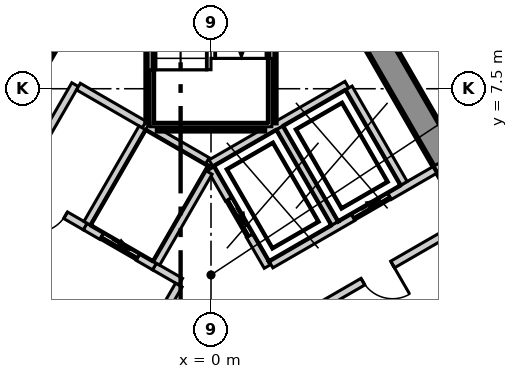
"""IFC4 building model, lengths in metres.
Left out: names, types, materials, properties, quantities, classifications, styles, units other than length and angle.
Written with IfcOpenShell. Run it as: python <this file> out.ifc"""

import sys

from ifc_helpers import new_model, si_unit, direction, frame, frame_2d, origin, place, context, subcontext, project, spatial, polyline, rectangle, outline, extrude, element, fill, save


model = new_model("IFC4")
c1 = context("Model", 3, precision=1e-05, world=origin(), true_north=direction((0.0, 1.0)))
c2 = subcontext(c1, "Body", "Model", "MODEL_VIEW")
j1 = project(units=[si_unit("LENGTHUNIT", "METRE"), si_unit("PLANEANGLEUNIT", "RADIAN")], contexts=[c1])
p1 = place(None, origin())
s1 = spatial("IfcSite", under=j1, at=p1, CompositionType="ELEMENT")
p2 = place(p1, origin())
s2 = spatial("IfcBuilding", under=s1, at=p2, CompositionType="ELEMENT")
p3 = place(p2, frame((0.0, 0.0, 239.3)))
s3 = spatial("IfcBuildingStorey", under=s2, at=p3, CompositionType="ELEMENT", Elevation=239.3)
p4 = place(p3, frame((-1.703, 13.35, -0.3), z_axis=(0.0, 0.0, 1.0), x_axis=(-0.500011533395, -0.866018744874, 0.0)))
e1 = element("IfcWall", 1, at=p4, inside=s3, PredefinedType="SHEAR", context=c2, shape_type="SweptSolid", body=[
    extrude(outline(polyline([(-0.202, -0.35), (1.782, -0.35), (3.766, -0.35), (5.75, -0.35), (7.734, -0.35), (9.718, -0.35), (11.702, -0.35), (13.686, -0.35), (15.67, -0.35), (17.654, -0.35), (19.638, -0.35), (21.622, -0.35), (21.218, 0.35), (19.307, 0.35), (17.397, 0.35), (15.486, 0.35), (13.576, 0.35), (11.665, 0.35), (9.755, 0.35), (7.844, 0.35), (5.934, 0.35), (4.023, 0.35), (2.113, 0.35), (0.202, 0.35), (-0.202, -0.35)])), origin(), (0.0, 0.0, 1.0), 4.0),
])
p5 = place(p4, frame((10.16, 0.0, 0.3)))
e2 = element("IfcOpeningElement", 2, at=p5, cuts=e1, PredefinedType="OPENING", context=c2, shape_type="SweptSolid", body=[
    extrude(rectangle(XDim=1.1, YDim=2.1, at=frame_2d((0.55, 1.05))), frame((0.0, 0.36, 0.0), z_axis=(0.0, -1.0, 0.0), x_axis=(1.0, 0.0, 0.0)), (0.0, 0.0, 1.0), 0.72),
])
p6 = place(p3, frame((12.413, -5.2, -0.3), z_axis=(0.0, 0.0, 1.0), x_axis=(-0.500011533395, 0.866018744874, 0.0)))
e3 = element("IfcWall", 3, at=p6, inside=s3, PredefinedType="SHEAR", context=c2, shape_type="SweptSolid", body=[
    extrude(outline(polyline([(-0.202, -0.35), (1.782, -0.35), (3.766, -0.35), (5.75, -0.35), (7.734, -0.35), (9.718, -0.35), (11.702, -0.35), (13.686, -0.35), (15.67, -0.35), (17.654, -0.35), (19.638, -0.35), (21.622, -0.35), (21.218, 0.35), (19.307, 0.35), (17.397, 0.35), (15.486, 0.35), (13.576, 0.35), (11.665, 0.35), (9.755, 0.35), (7.844, 0.35), (5.934, 0.35), (4.023, 0.35), (2.113, 0.35), (0.202, 0.35), (-0.202, -0.35)])), origin(), (0.0, 0.0, 1.0), 4.0),
])
p7 = place(p6, frame((4.055, 0.0, 0.3)))
e4 = element("IfcOpeningElement", 4, at=p7, cuts=e3, PredefinedType="OPENING", context=c2, shape_type="SweptSolid", body=[
    extrude(rectangle(XDim=0.9, YDim=2.1, at=frame_2d((0.45, 1.05))), frame((0.0, 0.36, 0.0), z_axis=(0.0, -1.0, 0.0), x_axis=(1.0, 0.0, 0.0)), (0.0, 0.0, 1.0), 0.72),
])
p8 = place(p6, frame((16.415, 0.0, 0.3)))
e5 = element("IfcOpeningElement", 5, at=p8, cuts=e3, PredefinedType="OPENING", context=c2, shape_type="SweptSolid", body=[
    extrude(rectangle(XDim=1.0, YDim=2.1, at=frame_2d((0.5, 1.05))), frame((0.0, 0.36, 0.0), z_axis=(0.0, -1.0, 0.0), x_axis=(1.0, 0.0, 0.0)), (0.0, 0.0, 1.0), 0.72),
])
p9 = place(p3, frame((-2.687, 29.995, 0.0), z_axis=(0.0, 0.0, 1.0), x_axis=(-0.499992950893, -0.86602947355, 0.0)))
e6 = element("IfcWall", 6, at=p9, inside=s3, PredefinedType="ELEMENTEDWALL", context=c2, shape_type="SweptSolid", body=[
    extrude(rectangle(XDim=49.247, YDim=0.2, at=frame_2d((24.624, 0.0))), origin(), (0.0, 0.0, 1.0), 3.7),
])
p10 = place(p9, frame((2.119, 0.0, 0.9)))
e7 = element("IfcOpeningElement", 7, at=p10, cuts=e6, PredefinedType="OPENING", context=c2, shape_type="SweptSolid", body=[
    extrude(rectangle(XDim=4.2, YDim=2.5, at=frame_2d((2.1, 1.25))), frame((0.0, 0.11, 0.0), z_axis=(0.0, -1.0, 0.0), x_axis=(1.0, 0.0, 0.0)), (0.0, 0.0, 1.0), 0.22),
])
p11 = place(p9, frame((7.951, 0.0, 0.9)))
e8 = element("IfcOpeningElement", 8, at=p11, cuts=e6, PredefinedType="OPENING", context=c2, shape_type="SweptSolid", body=[
    extrude(rectangle(XDim=4.2, YDim=2.5, at=frame_2d((2.1, 1.25))), frame((0.0, 0.11, 0.0), z_axis=(0.0, -1.0, 0.0), x_axis=(1.0, 0.0, 0.0)), (0.0, 0.0, 1.0), 0.22),
])
p12 = place(p9, frame((13.784, 0.0, 0.9)))
e9 = element("IfcOpeningElement", 9, at=p12, cuts=e6, PredefinedType="OPENING", context=c2, shape_type="SweptSolid", body=[
    extrude(rectangle(XDim=4.2, YDim=2.5, at=frame_2d((2.1, 1.25))), frame((0.0, 0.11, 0.0), z_axis=(0.0, -1.0, 0.0), x_axis=(1.0, 0.0, 0.0)), (0.0, 0.0, 1.0), 0.22),
])
p13 = place(p9, frame((19.617, 0.0, 0.9)))
e10 = element("IfcOpeningElement", 10, at=p13, cuts=e6, PredefinedType="OPENING", context=c2, shape_type="SweptSolid", body=[
    extrude(rectangle(XDim=4.2, YDim=2.5, at=frame_2d((2.1, 1.25))), frame((0.0, 0.11, 0.0), z_axis=(0.0, -1.0, 0.0), x_axis=(1.0, 0.0, 0.0)), (0.0, 0.0, 1.0), 0.22),
])
p14 = place(p9, frame((25.449, 0.0, 0.9)))
e11 = element("IfcOpeningElement", 11, at=p14, cuts=e6, PredefinedType="OPENING", context=c2, shape_type="SweptSolid", body=[
    extrude(rectangle(XDim=4.2, YDim=2.5, at=frame_2d((2.1, 1.25))), frame((0.0, 0.11, 0.0), z_axis=(0.0, -1.0, 0.0), x_axis=(1.0, 0.0, 0.0)), (0.0, 0.0, 1.0), 0.22),
])
p15 = place(p9, frame((31.282, 0.0, 0.9)))
e12 = element("IfcOpeningElement", 12, at=p15, cuts=e6, PredefinedType="OPENING", context=c2, shape_type="SweptSolid", body=[
    extrude(rectangle(XDim=4.2, YDim=2.5, at=frame_2d((2.1, 1.25))), frame((0.0, 0.11, 0.0), z_axis=(0.0, -1.0, 0.0), x_axis=(1.0, 0.0, 0.0)), (0.0, 0.0, 1.0), 0.22),
])
p16 = place(p9, frame((37.115, 0.0, 0.9)))
e13 = element("IfcOpeningElement", 13, at=p16, cuts=e6, PredefinedType="OPENING", context=c2, shape_type="SweptSolid", body=[
    extrude(rectangle(XDim=4.2, YDim=2.5, at=frame_2d((2.1, 1.25))), frame((0.0, 0.11, 0.0), z_axis=(0.0, -1.0, 0.0), x_axis=(1.0, 0.0, 0.0)), (0.0, 0.0, 1.0), 0.22),
])
p17 = place(p9, frame((42.947, 0.0, 0.9)))
e14 = element("IfcOpeningElement", 14, at=p17, cuts=e6, PredefinedType="OPENING", context=c2, shape_type="SweptSolid", body=[
    extrude(rectangle(XDim=4.2, YDim=2.5, at=frame_2d((2.1, 1.25))), frame((0.0, 0.11, 0.0), z_axis=(0.0, -1.0, 0.0), x_axis=(1.0, 0.0, 0.0)), (0.0, 0.0, 1.0), 0.22),
])
p18 = place(p3, frame((27.32, -12.671, 0.0), z_axis=(0.0, 0.0, 1.0), x_axis=(-0.499995097538, 0.866028234204, 0.0)))
e15 = element("IfcWall", 15, at=p18, inside=s3, PredefinedType="ELEMENTEDWALL", context=c2, shape_type="SweptSolid", body=[
    extrude(rectangle(XDim=49.247, YDim=0.2, at=frame_2d((24.623, 0.0))), origin(), (0.0, 0.0, 1.0), 3.7),
])
p19 = place(p18, frame((2.119, 0.0, 0.9)))
e16 = element("IfcOpeningElement", 16, at=p19, cuts=e15, PredefinedType="OPENING", context=c2, shape_type="SweptSolid", body=[
    extrude(rectangle(XDim=4.2, YDim=2.5, at=frame_2d((2.1, 1.25))), frame((0.0, 0.11, 0.0), z_axis=(0.0, -1.0, 0.0), x_axis=(1.0, 0.0, 0.0)), (0.0, 0.0, 1.0), 0.22),
])
p20 = place(p18, frame((7.952, 0.0, 0.9)))
e17 = element("IfcOpeningElement", 17, at=p20, cuts=e15, PredefinedType="OPENING", context=c2, shape_type="SweptSolid", body=[
    extrude(rectangle(XDim=4.2, YDim=2.5, at=frame_2d((2.1, 1.25))), frame((0.0, 0.11, 0.0), z_axis=(0.0, -1.0, 0.0), x_axis=(1.0, 0.0, 0.0)), (0.0, 0.0, 1.0), 0.22),
])
p21 = place(p18, frame((13.784, 0.0, 0.9)))
e18 = element("IfcOpeningElement", 18, at=p21, cuts=e15, PredefinedType="OPENING", context=c2, shape_type="SweptSolid", body=[
    extrude(rectangle(XDim=4.2, YDim=2.5, at=frame_2d((2.1, 1.25))), frame((0.0, 0.11, 0.0), z_axis=(0.0, -1.0, 0.0), x_axis=(1.0, 0.0, 0.0)), (0.0, 0.0, 1.0), 0.22),
])
p22 = place(p18, frame((19.617, 0.0, 0.9)))
e19 = element("IfcOpeningElement", 19, at=p22, cuts=e15, PredefinedType="OPENING", context=c2, shape_type="SweptSolid", body=[
    extrude(rectangle(XDim=4.2, YDim=2.5, at=frame_2d((2.1, 1.25))), frame((0.0, 0.11, 0.0), z_axis=(0.0, -1.0, 0.0), x_axis=(1.0, 0.0, 0.0)), (0.0, 0.0, 1.0), 0.22),
])
p23 = place(p18, frame((25.45, 0.0, 0.9)))
e20 = element("IfcOpeningElement", 20, at=p23, cuts=e15, PredefinedType="OPENING", context=c2, shape_type="SweptSolid", body=[
    extrude(rectangle(XDim=4.2, YDim=2.5, at=frame_2d((2.1, 1.25))), frame((0.0, 0.11, 0.0), z_axis=(0.0, -1.0, 0.0), x_axis=(1.0, 0.0, 0.0)), (0.0, 0.0, 1.0), 0.22),
])
p24 = place(p18, frame((31.282, 0.0, 0.9)))
e21 = element("IfcOpeningElement", 21, at=p24, cuts=e15, PredefinedType="OPENING", context=c2, shape_type="SweptSolid", body=[
    extrude(rectangle(XDim=4.2, YDim=2.5, at=frame_2d((2.1, 1.25))), frame((0.0, 0.11, 0.0), z_axis=(0.0, -1.0, 0.0), x_axis=(1.0, 0.0, 0.0)), (0.0, 0.0, 1.0), 0.22),
])
p25 = place(p18, frame((37.115, 0.0, 0.9)))
e22 = element("IfcOpeningElement", 22, at=p25, cuts=e15, PredefinedType="OPENING", context=c2, shape_type="SweptSolid", body=[
    extrude(rectangle(XDim=4.2, YDim=2.5, at=frame_2d((2.1, 1.25))), frame((0.0, 0.11, 0.0), z_axis=(0.0, -1.0, 0.0), x_axis=(1.0, 0.0, 0.0)), (0.0, 0.0, 1.0), 0.22),
])
p26 = place(p18, frame((42.947, 0.0, 0.9)))
e23 = element("IfcOpeningElement", 23, at=p26, cuts=e15, PredefinedType="OPENING", context=c2, shape_type="SweptSolid", body=[
    extrude(rectangle(XDim=4.2, YDim=2.5, at=frame_2d((2.1, 1.25))), frame((0.0, 0.11, 0.0), z_axis=(0.0, -1.0, 0.0), x_axis=(1.0, 0.0, 0.0)), (0.0, 0.0, 1.0), 0.22),
])
p27 = place(p3, frame((-20.883, -11.97, 0.0), z_axis=(0.0, 0.0, 1.0), x_axis=(0.500006150555, 0.866021852731, 0.0)))
e24 = element("IfcWall", 24, at=p27, inside=s3, PredefinedType="PARTITIONING", context=c2, shape_type="SweptSolid", body=[
    extrude(rectangle(XDim=41.766, YDim=0.15, at=frame_2d((20.883, 0.0))), origin(), (0.0, 0.0, 1.0), 3.7),
])
p28 = place(p27, frame((36.616, 0.0, 0.0)))
e25 = element("IfcOpeningElement", 25, at=p28, cuts=e24, PredefinedType="OPENING", context=c2, shape_type="SweptSolid", body=[
    extrude(rectangle(XDim=1.1, YDim=2.1, at=frame_2d((0.55, 1.05))), frame((0.0, 0.085, 0.0), z_axis=(0.0, -1.0, 0.0), x_axis=(1.0, 0.0, 0.0)), (0.0, 0.0, 1.0), 0.17),
])
p29 = place(p27, frame((21.723, 0.0, 0.0)))
e26 = element("IfcOpeningElement", 26, at=p29, cuts=e24, PredefinedType="OPENING", context=c2, shape_type="SweptSolid", body=[
    extrude(rectangle(XDim=1.1, YDim=2.1, at=frame_2d((0.55, 1.05))), frame((0.0, 0.085, 0.0), z_axis=(0.0, -1.0, 0.0), x_axis=(1.0, 0.0, 0.0)), (0.0, 0.0, 1.0), 0.17),
])
p30 = place(p27, frame((30.423, 0.0, 0.0)))
e27 = element("IfcOpeningElement", 27, at=p30, cuts=e24, PredefinedType="OPENING", context=c2, shape_type="SweptSolid", body=[
    extrude(rectangle(XDim=0.9, YDim=2.1, at=frame_2d((0.45, 1.05))), frame((0.0, 0.085, 0.0), z_axis=(0.0, -1.0, 0.0), x_axis=(1.0, 0.0, 0.0)), (0.0, 0.0, 1.0), 0.17),
])
p31 = place(p27, frame((27.223, 0.0, 0.0)))
e28 = element("IfcOpeningElement", 28, at=p31, cuts=e24, PredefinedType="OPENING", context=c2, shape_type="SweptSolid", body=[
    extrude(rectangle(XDim=0.9, YDim=2.1, at=frame_2d((0.45, 1.05))), frame((0.0, 0.085, 0.0), z_axis=(0.0, -1.0, 0.0), x_axis=(1.0, 0.0, 0.0)), (0.0, 0.0, 1.0), 0.17),
])
p32 = place(p27, frame((24.323, 0.0, 0.0)))
e29 = element("IfcOpeningElement", 29, at=p32, cuts=e24, PredefinedType="OPENING", context=c2, shape_type="SweptSolid", body=[
    extrude(rectangle(XDim=1.0, YDim=2.1, at=frame_2d((0.5, 1.05))), frame((0.0, 0.085, 0.0), z_axis=(0.0, -1.0, 0.0), x_axis=(1.0, 0.0, 0.0)), (0.0, 0.0, 1.0), 0.17),
])
p33 = place(p27, frame((17.358, 0.0, 0.0)))
e30 = element("IfcOpeningElement", 30, at=p33, cuts=e24, PredefinedType="OPENING", context=c2, shape_type="SweptSolid", body=[
    extrude(rectangle(XDim=1.0, YDim=2.1, at=frame_2d((0.5, 1.05))), frame((0.0, 0.085, 0.0), z_axis=(0.0, -1.0, 0.0), x_axis=(1.0, 0.0, 0.0)), (0.0, 0.0, 1.0), 0.17),
])
p34 = place(p27, frame((6.825, 0.0, 0.0)))
e31 = element("IfcOpeningElement", 31, at=p34, cuts=e24, PredefinedType="OPENING", context=c2, shape_type="SweptSolid", body=[
    extrude(rectangle(XDim=1.1, YDim=2.1, at=frame_2d((0.55, 1.05))), frame((0.0, 0.085, 0.0), z_axis=(0.0, -1.0, 0.0), x_axis=(1.0, 0.0, 0.0)), (0.0, 0.0, 1.0), 0.17),
])
p35 = place(p3, frame((0.075, 24.07, 0.0), z_axis=(0.0, 0.0, 1.0), x_axis=(0.500006834213, -0.866021458014, 0.0)))
e32 = element("IfcWall", 32, at=p35, inside=s3, PredefinedType="PARTITIONING", context=c2, shape_type="SweptSolid", body=[
    extrude(rectangle(XDim=41.616, YDim=0.15, at=frame_2d((20.808, 0.0))), origin(), (0.0, 0.0, 1.0), 3.7),
])
p36 = place(p35, frame((36.616, 0.0, 0.0)))
e33 = element("IfcOpeningElement", 33, at=p36, cuts=e32, PredefinedType="OPENING", context=c2, shape_type="SweptSolid", body=[
    extrude(rectangle(XDim=1.1, YDim=2.1, at=frame_2d((0.55, 1.05))), frame((0.0, 0.085, 0.0), z_axis=(0.0, -1.0, 0.0), x_axis=(1.0, 0.0, 0.0)), (0.0, 0.0, 1.0), 0.17),
])
p37 = place(p35, frame((29.024, 0.0, 0.0)))
e34 = element("IfcOpeningElement", 34, at=p37, cuts=e32, PredefinedType="OPENING", context=c2, shape_type="SweptSolid", body=[
    extrude(rectangle(XDim=1.0, YDim=2.1, at=frame_2d((0.5, 1.05))), frame((0.0, 0.085, 0.0), z_axis=(0.0, -1.0, 0.0), x_axis=(1.0, 0.0, 0.0)), (0.0, 0.0, 1.0), 0.17),
])
p38 = place(p35, frame((23.19, 0.0, 0.0)))
e35 = element("IfcOpeningElement", 35, at=p38, cuts=e32, PredefinedType="OPENING", context=c2, shape_type="SweptSolid", body=[
    extrude(rectangle(XDim=1.0, YDim=2.1, at=frame_2d((0.5, 1.05))), frame((0.0, 0.085, 0.0), z_axis=(0.0, -1.0, 0.0), x_axis=(1.0, 0.0, 0.0)), (0.0, 0.0, 1.0), 0.17),
])
p39 = place(p35, frame((14.458, 0.0, 0.0)))
e36 = element("IfcOpeningElement", 36, at=p39, cuts=e32, PredefinedType="OPENING", context=c2, shape_type="SweptSolid", body=[
    extrude(rectangle(XDim=1.1, YDim=2.1, at=frame_2d((0.55, 1.05))), frame((0.0, 0.085, 0.0), z_axis=(0.0, -1.0, 0.0), x_axis=(1.0, 0.0, 0.0)), (0.0, 0.0, 1.0), 0.17),
])
p40 = place(p35, frame((3.993, 0.0, 0.0)))
e37 = element("IfcOpeningElement", 37, at=p40, cuts=e32, PredefinedType="OPENING", context=c2, shape_type="SweptSolid", body=[
    extrude(rectangle(XDim=1.1, YDim=2.1, at=frame_2d((0.55, 1.05))), frame((0.0, 0.085, 0.0), z_axis=(0.0, -1.0, 0.0), x_axis=(1.0, 0.0, 0.0)), (0.0, 0.0, 1.0), 0.17),
])
p41 = place(p3, frame((-0.002, 5.541, 0.0), z_axis=(0.0, 0.0, 1.0), x_axis=(0.86600155993, 0.500041296494, 0.0)))
e38 = element("IfcWall", 38, at=p41, inside=s3, PredefinedType="SOLIDWALL", context=c2, shape_type="SweptSolid", body=[
    extrude(rectangle(XDim=4.132, YDim=0.2, at=frame_2d((2.066, 0.0))), origin(), (0.0, 0.0, 1.0), 3.7),
])
p42 = place(p3, frame((0.0, 5.4, 0.0), z_axis=(0.0, 0.0, 1.0), x_axis=(0.500103862429, -0.865965430478, 0.0)))
e39 = element("IfcWall", 39, at=p42, inside=s3, PredefinedType="SOLIDWALL", context=c2, shape_type="SweptSolid", body=[
    extrude(rectangle(XDim=2.973, YDim=0.2, at=frame_2d((1.487, 0.0))), origin(), (0.0, 0.0, 1.0), 3.7),
])
p43 = place(p42, frame((0.937, 0.0, 0.0)))
e40 = element("IfcOpeningElement", 40, at=p43, cuts=e39, PredefinedType="OPENING", context=c2, shape_type="SweptSolid", body=[
    extrude(rectangle(XDim=1.1, YDim=2.1, at=frame_2d((0.55, 1.05))), frame((0.0, 0.11, 0.0), z_axis=(0.0, -1.0, 0.0), x_axis=(1.0, 0.0, 0.0)), (0.0, 0.0, 1.0), 0.22),
])
p44 = place(p3, frame((1.578, 2.874, 0.0), z_axis=(0.0, 0.0, 1.0), x_axis=(0.866045911672, 0.499964477614, 0.0)))
e41 = element("IfcWall", 41, at=p44, inside=s3, PredefinedType="SOLIDWALL", context=c2, shape_type="SweptSolid", body=[
    extrude(rectangle(XDim=5.327, YDim=0.2, at=frame_2d((2.663, 0.0))), origin(), (0.0, 0.0, 1.0), 3.7),
])
p45 = place(p44, frame((2.496, 0.0, 0.0)))
e42 = element("IfcOpeningElement", 42, at=p45, cuts=e41, PredefinedType="OPENING", context=c2, shape_type="SweptSolid", body=[
    extrude(rectangle(XDim=1.1, YDim=2.1, at=frame_2d((0.55, 1.05))), frame((0.0, 0.11, 0.0), z_axis=(0.0, -1.0, 0.0), x_axis=(1.0, 0.0, 0.0)), (0.0, 0.0, 1.0), 0.22),
])
for number, where, z_axis, x_axis in (
    (43, (3.626, 7.52, 0.0), (0.0, 0.0, 1.0), (0.5, -0.866, 0.0)),
    (44, (1.807, 6.47, 0.0), (0.0, 0.0, 1.0), (0.5, -0.866, 0.0)),
):
    element("IfcWall", number, at=place(p3, frame(where, z_axis=z_axis, x_axis=x_axis)), inside=s3, PredefinedType="SOLIDWALL", context=c2, shape_type="SweptSolid", body=[
        extrude(rectangle(XDim=2.9, YDim=0.2, at=frame_2d((1.45, 0.0))), origin(), (0.0, 0.0, 1.0), 3.7),
    ])
p46 = place(p3, frame((2.548, 1.587, 0.0), z_axis=(0.0, 0.0, 1.0), x_axis=(0.866004344652, 0.500036473714, 0.0)))
e45 = element("IfcWall", 45, at=p46, inside=s3, PredefinedType="SOLIDWALL", context=c2, shape_type="SweptSolid", body=[
    extrude(rectangle(XDim=4.15, YDim=0.2, at=frame_2d((2.075, 0.0))), origin(), (0.0, 0.0, 1.0), 3.7),
])
p47 = place(p46, frame((1.675, 0.0, 0.0)))
e46 = element("IfcOpeningElement", 46, at=p47, cuts=e45, PredefinedType="OPENING", context=c2, shape_type="SweptSolid", body=[
    extrude(rectangle(XDim=0.9, YDim=2.1, at=frame_2d((0.45, 1.05))), frame((0.0, 0.11, 0.0), z_axis=(0.0, -1.0, 0.0), x_axis=(1.0, 0.0, 0.0)), (0.0, 0.0, 1.0), 0.22),
])
p48 = place(p3, frame((-6.191, 5.537, 0.0), z_axis=(0.0, 0.0, 1.0), x_axis=(0.866052607023, -0.499952879648, 0.0)))
e47 = element("IfcWall", 47, at=p48, inside=s3, PredefinedType="SOLIDWALL", context=c2, shape_type="SweptSolid", body=[
    extrude(rectangle(XDim=3.332, YDim=0.2, at=frame_2d((1.666, 0.0))), origin(), (0.0, 0.0, 1.0), 3.7),
])
p49 = place(p48, frame((1.83, 0.0, 0.0)))
e48 = element("IfcOpeningElement", 48, at=p49, cuts=e47, PredefinedType="OPENING", context=c2, shape_type="SweptSolid", body=[
    extrude(rectangle(XDim=0.9, YDim=2.1, at=frame_2d((0.45, 1.05))), frame((0.0, 0.11, 0.0), z_axis=(0.0, -1.0, 0.0), x_axis=(1.0, 0.0, 0.0)), (0.0, 0.0, 1.0), 0.22),
])
p50 = place(p3, frame((-1.488, 2.822, 0.0), z_axis=(0.0, 0.0, 1.0), x_axis=(0.866236612152, -0.499633997809, 0.0)))
e49 = element("IfcWall", 49, at=p50, inside=s3, PredefinedType="SOLIDWALL", context=c2, shape_type="SweptSolid", body=[
    extrude(rectangle(XDim=0.796, YDim=0.2, at=frame_2d((0.398, 0.0))), origin(), (0.0, 0.0, 1.0), 3.7),
])
p51 = place(p3, frame((-5.076, 5.009, 0.0), z_axis=(0.0, 0.0, 1.0), x_axis=(0.50002537861, 0.866010750942, 0.0)))
e50 = element("IfcWall", 50, at=p51, inside=s3, PredefinedType="SOLIDWALL", context=c2, shape_type="SweptSolid", body=[
    extrude(rectangle(XDim=3.0, YDim=0.2, at=frame_2d((1.5, 0.0))), origin(), (0.0, 0.0, 1.0), 3.7),
])
p52 = place(p3, frame((-3.489, 7.557, 0.0), z_axis=(0.0, 0.0, 1.0), x_axis=(0.866010750942, -0.50002537861, 0.0)))
e51 = element("IfcWall", 51, at=p52, inside=s3, PredefinedType="SOLIDWALL", context=c2, shape_type="SweptSolid", body=[
    extrude(rectangle(XDim=2.0, YDim=0.2, at=frame_2d((1.0, 0.0))), origin(), (0.0, 0.0, 1.0), 3.7),
])
p53 = place(p3, frame((-2.444, -0.433, 0.0), z_axis=(0.0, 0.0, 1.0), x_axis=(0.500035624827, 0.866004834804, 0.0)))
e52 = element("IfcWall", 52, at=p53, inside=s3, PredefinedType="SOLIDWALL", context=c2, shape_type="SweptSolid", body=[
    extrude(rectangle(XDim=3.194, YDim=0.2, at=frame_2d((1.597, 0.0))), origin(), (0.0, 0.0, 1.0), 3.7),
])
p54 = place(p3, frame((-3.309, 3.873, 0.0), z_axis=(0.0, 0.0, 1.0), x_axis=(0.866098583652, -0.499873227325, 0.0)))
e53 = element("IfcWall", 53, at=p54, inside=s3, PredefinedType="SOLIDWALL", context=c2, shape_type="SweptSolid", body=[
    extrude(rectangle(XDim=2.103, YDim=0.2, at=frame_2d((1.051, 0.0))), origin(), (0.0, 0.0, 1.0), 3.7),
])
p55 = place(p54, frame((0.502, 0.0, 0.0)))
e54 = element("IfcOpeningElement", 54, at=p55, cuts=e53, PredefinedType="OPENING", context=c2, shape_type="SweptSolid", body=[
    extrude(rectangle(XDim=1.1, YDim=2.1, at=frame_2d((0.55, 1.05))), frame((0.0, 0.11, 0.0), z_axis=(0.0, -1.0, 0.0), x_axis=(1.0, 0.0, 0.0)), (0.0, 0.0, 1.0), 0.22),
])
p56 = place(p3, frame((-3.257, 3.959, 0.0), z_axis=(0.0, 0.0, 1.0), x_axis=(0.50012328804, 0.865954211699, 0.0)))
e55 = element("IfcWall", 55, at=p56, inside=s3, PredefinedType="SOLIDWALL", context=c2, shape_type="SweptSolid", body=[
    extrude(rectangle(XDim=2.9, YDim=0.2, at=frame_2d((1.45, 0.0))), origin(), (0.0, 0.0, 1.0), 3.7),
])
p57 = place(p3, frame((-1.67, 6.507, 0.0), z_axis=(0.0, 0.0, 1.0), x_axis=(0.865941441609, -0.500145398563, 0.0)))
e56 = element("IfcWall", 56, at=p57, inside=s3, PredefinedType="SOLIDWALL", context=c2, shape_type="SweptSolid", body=[
    extrude(rectangle(XDim=1.815, YDim=0.2, at=frame_2d((0.908, 0.0))), origin(), (0.0, 0.0, 1.0), 3.7),
])
p58 = place(p3, frame((-1.438, 2.909, 0.0), z_axis=(0.0, 0.0, 1.0), x_axis=(0.499829630636, 0.866123744241, 0.0)))
e57 = element("IfcWall", 57, at=p58, inside=s3, PredefinedType="SOLIDWALL", context=c2, shape_type="SweptSolid", body=[
    extrude(rectangle(XDim=2.761, YDim=0.2, at=frame_2d((1.38, 0.0))), origin(), (0.0, 0.0, 1.0), 3.7),
])
p59 = place(p3, frame((1.6, 6.615, 0.0), z_axis=(0.0, 0.0, 1.0), x_axis=(0.0, 1.0, 0.0)))
e58 = element("IfcWall", 58, at=p59, inside=s3, PredefinedType="SOLIDWALL", context=c2, shape_type="SweptSolid", body=[
    extrude(rectangle(XDim=6.715, YDim=0.2, at=frame_2d((3.357, 0.0))), origin(), (0.0, 0.0, 1.0), 3.7),
])
p60 = place(p3, frame((-1.4, 6.5, 0.0), z_axis=(0.0, 0.0, 1.0), x_axis=(1.0, 0.0, 0.0)))
e59 = element("IfcWall", 59, at=p60, inside=s3, PredefinedType="SOLIDWALL", context=c2, shape_type="SweptSolid", body=[
    extrude(rectangle(XDim=2.8, YDim=0.2, at=frame_2d((1.4, 0.0))), origin(), (0.0, 0.0, 1.0), 3.7),
])
p61 = place(p3, frame((-1.6, 6.615, 0.0), z_axis=(0.0, 0.0, 1.0), x_axis=(0.0, 1.0, 0.0)))
e60 = element("IfcWall", 60, at=p61, inside=s3, PredefinedType="SOLIDWALL", context=c2, shape_type="SweptSolid", body=[
    extrude(rectangle(XDim=6.715, YDim=0.2, at=frame_2d((3.357, 0.0))), origin(), (0.0, 0.0, 1.0), 3.7),
])
p62 = place(p43, origin())
e61 = element("IfcDoor", 61, at=p62, inside=s3, OperationType="SLIDING_TO_LEFT", PredefinedType="DOOR", context=c2, shape_type="SweptSolid", body=[
    extrude(rectangle(XDim=1.1, YDim=2.1, at=frame_2d((0.55, 1.05))), frame((0.0, 0.025, 0.0), z_axis=(0.0, -1.0, 0.0), x_axis=(1.0, 0.0, 0.0)), (0.0, 0.0, 1.0), 0.05),
])
fill(e40, e61)
p63 = place(p45, origin())
e62 = element("IfcDoor", 62, at=p63, inside=s3, OperationType="SLIDING_TO_LEFT", PredefinedType="DOOR", context=c2, shape_type="SweptSolid", body=[
    extrude(rectangle(XDim=1.1, YDim=2.1, at=frame_2d((0.55, 1.05))), frame((0.0, 0.025, 0.0), z_axis=(0.0, -1.0, 0.0), x_axis=(1.0, 0.0, 0.0)), (0.0, 0.0, 1.0), 0.05),
])
fill(e42, e62)
p64 = place(p55, origin())
e63 = element("IfcDoor", 63, at=p64, inside=s3, OperationType="SLIDING_TO_LEFT", PredefinedType="DOOR", context=c2, shape_type="SweptSolid", body=[
    extrude(rectangle(XDim=1.1, YDim=2.1, at=frame_2d((0.55, 1.05))), frame((0.0, 0.025, 0.0), z_axis=(0.0, -1.0, 0.0), x_axis=(1.0, 0.0, 0.0)), (0.0, 0.0, 1.0), 0.05),
])
fill(e54, e63)
p65 = place(p49, origin())
e64 = element("IfcDoor", 64, at=p65, inside=s3, OperationType="SINGLE_SWING_LEFT", PredefinedType="DOOR", context=c2, shape_type="SweptSolid", body=[
    extrude(rectangle(XDim=0.9, YDim=2.1, at=frame_2d((0.45, 1.05))), frame((0.0, 0.025, 0.0), z_axis=(0.0, -1.0, 0.0), x_axis=(1.0, 0.0, 0.0)), (0.0, 0.0, 1.0), 0.05),
])
fill(e48, e64)
p66 = place(p47, origin())
e65 = element("IfcDoor", 65, at=p66, inside=s3, OperationType="SINGLE_SWING_RIGHT", PredefinedType="DOOR", context=c2, shape_type="SweptSolid", body=[
    extrude(rectangle(XDim=0.9, YDim=2.1, at=frame_2d((0.45, 1.05))), frame((0.0, 0.025, 0.0), z_axis=(0.0, -1.0, 0.0), x_axis=(1.0, 0.0, 0.0)), (0.0, 0.0, 1.0), 0.05),
])
fill(e46, e65)
save(model, sys.argv[1])
